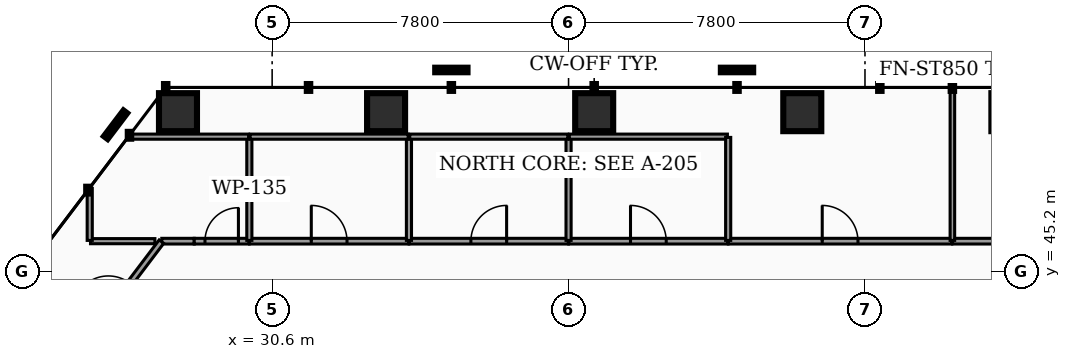
"""IFC4 building model, lengths in metres.
Left out: names, types, materials, properties, quantities, classifications, styles, units other than length and angle.
Written with IfcOpenShell. Run it as: python <this file> out.ifc"""

import sys

from ifc_helpers import new_model, si_unit, direction, frame, frame_2d, origin, origin_2d, place, context, subcontext, project, spatial, rectangle, hollow_rectangle, extrude, element, fill, save


model = new_model("IFC4")
c1 = context("Model", 3, precision=1e-05, world=origin(), true_north=direction((0.0, 1.0)))
c2 = subcontext(c1, "Body", "Model", "MODEL_VIEW")
j1 = project(units=[si_unit("LENGTHUNIT", "METRE"), si_unit("PLANEANGLEUNIT", "RADIAN")], contexts=[c1])
p1 = place(None, origin())
s1 = spatial("IfcSite", under=j1, at=p1, CompositionType="ELEMENT")
p2 = place(p1, origin())
s2 = spatial("IfcBuilding", under=s1, at=p2, CompositionType="ELEMENT")
p3 = place(p2, frame((0.0, 0.0, 43.86)))
s3 = spatial("IfcBuildingStorey", under=s2, at=p3, CompositionType="ELEMENT", Elevation=43.86)
for number, where, z_axis, x_axis in (
    (1, (44.55, 49.394, 0.0), (0.0, 0.0, 1.0), (1.0, 0.0, 0.0)),
    (2, (39.074, 49.394, 0.0), (0.0, 0.0, 1.0), (1.0, 0.0, 0.0)),
    (3, (33.598, 49.394, 0.0), (0.0, 0.0, 1.0), (1.0, 0.0, 0.0)),
    (4, (28.122, 49.394, 0.0), (0.0, 0.0, 1.0), (1.0, 0.0, 0.0)),
):
    element("IfcColumn", number, at=place(p3, frame(where, z_axis=z_axis, x_axis=x_axis)), inside=s3, PredefinedType="COLUMN", context=c2, shape_type="SweptSolid", body=[
        extrude(hollow_rectangle(XDim=1.0, YDim=1.0, WallThickness=0.05, at=origin_2d()), origin(), (0.0, 0.0, 1.0), 3.82),
    ])
p4 = place(p3, frame((27.696, 46.0, 0.0), z_axis=(0.0, 0.0, 1.0), x_axis=(1.0, 0.0, 0.0)))
e5 = element("IfcWall", 5, at=p4, inside=s3, PredefinedType="PARTITIONING", context=c2, shape_type="SweptSolid", body=[
    extrude(rectangle(XDim=0.854, YDim=0.15, at=frame_2d((0.427, 0.0))), origin(), (0.0, 0.0, 1.0), 2.777),
])
p5 = place(p3, frame((28.55, 46.0, 0.0), z_axis=(0.0, 0.0, 1.0), x_axis=(1.0, 0.0, 0.0)))
e6 = element("IfcWall", 6, at=p5, inside=s3, PredefinedType="PARTITIONING", context=c2, shape_type="SweptSolid", body=[
    extrude(rectangle(XDim=1.445, YDim=0.15, at=frame_2d((0.723, 0.0))), origin(), (0.0, 0.0, 1.0), 2.777),
])
p6 = place(p5, frame((0.282, 0.0, 0.0)))
e7 = element("IfcOpeningElement", 7, at=p6, cuts=e6, PredefinedType="OPENING", context=c2, shape_type="SweptSolid", body=[
    extrude(rectangle(XDim=0.88, YDim=2.05, at=frame_2d((0.44, 1.025))), frame((0.0, 0.085, 0.0), z_axis=(0.0, -1.0, 0.0), x_axis=(1.0, 0.0, 0.0)), (0.0, 0.0, 1.0), 0.17),
])
p7 = place(p3, frame((30.005, 46.0, 0.0), z_axis=(0.0, 0.0, 1.0), x_axis=(1.0, 0.0, 0.0)))
e8 = element("IfcWall", 8, at=p7, inside=s3, PredefinedType="PARTITIONING", context=c2, shape_type="SweptSolid", body=[
    extrude(rectangle(XDim=4.19, YDim=0.15, at=frame_2d((2.095, 0.0))), origin(), (0.0, 0.0, 1.0), 2.777),
])
p8 = place(p7, frame((1.625, 0.0, 0.0)))
e9 = element("IfcOpeningElement", 9, at=p8, cuts=e8, PredefinedType="OPENING", context=c2, shape_type="SweptSolid", body=[
    extrude(rectangle(XDim=0.94, YDim=2.05, at=frame_2d((0.47, 1.025))), frame((0.0, 0.085, 0.0), z_axis=(0.0, -1.0, 0.0), x_axis=(1.0, 0.0, 0.0)), (0.0, 0.0, 1.0), 0.17),
])
p9 = place(p3, frame((34.205, 46.0, 0.0), z_axis=(0.0, 0.0, 1.0), x_axis=(1.0, 0.0, 0.0)))
e10 = element("IfcWall", 10, at=p9, inside=s3, PredefinedType="PARTITIONING", context=c2, shape_type="SweptSolid", body=[
    extrude(rectangle(XDim=4.19, YDim=0.15, at=frame_2d((2.095, 0.0))), origin(), (0.0, 0.0, 1.0), 2.777),
])
p10 = place(p9, frame((1.625, 0.0, 0.0)))
e11 = element("IfcOpeningElement", 11, at=p10, cuts=e10, PredefinedType="OPENING", context=c2, shape_type="SweptSolid", body=[
    extrude(rectangle(XDim=0.94, YDim=2.05, at=frame_2d((0.47, 1.025))), frame((0.0, 0.085, 0.0), z_axis=(0.0, -1.0, 0.0), x_axis=(1.0, 0.0, 0.0)), (0.0, 0.0, 1.0), 0.17),
])
p11 = place(p3, frame((38.405, 46.0, 0.0), z_axis=(0.0, 0.0, 1.0), x_axis=(1.0, 0.0, 0.0)))
e12 = element("IfcWall", 12, at=p11, inside=s3, PredefinedType="PARTITIONING", context=c2, shape_type="SweptSolid", body=[
    extrude(rectangle(XDim=4.19, YDim=0.15, at=frame_2d((2.095, 0.0))), origin(), (0.0, 0.0, 1.0), 2.777),
])
p12 = place(p11, frame((1.625, 0.0, 0.0)))
e13 = element("IfcOpeningElement", 13, at=p12, cuts=e12, PredefinedType="OPENING", context=c2, shape_type="SweptSolid", body=[
    extrude(rectangle(XDim=0.94, YDim=2.05, at=frame_2d((0.47, 1.025))), frame((0.0, 0.085, 0.0), z_axis=(0.0, -1.0, 0.0), x_axis=(1.0, 0.0, 0.0)), (0.0, 0.0, 1.0), 0.17),
])
p13 = place(p3, frame((25.462, 43.051, 0.0), z_axis=(0.0, 0.0, 1.0), x_axis=(0.603862791153, 0.7970882821, 0.0)))
e14 = element("IfcWall", 14, at=p13, inside=s3, PredefinedType="PARTITIONING", context=c2, shape_type="SweptSolid", body=[
    extrude(rectangle(XDim=3.684, YDim=0.15, at=frame_2d((1.842, 0.0))), origin(), (0.0, 0.0, 1.0), 2.777),
])
p14 = place(p13, frame((1.372, 0.0, 0.0)))
e15 = element("IfcOpeningElement", 15, at=p14, cuts=e14, PredefinedType="OPENING", context=c2, shape_type="SweptSolid", body=[
    extrude(rectangle(XDim=0.94, YDim=2.05, at=frame_2d((0.47, 1.025))), frame((0.0, 0.085, 0.0), z_axis=(0.0, -1.0, 0.0), x_axis=(1.0, 0.0, 0.0)), (0.0, 0.0, 1.0), 0.17),
])
p15 = place(p3, frame((48.505, 46.0, 0.0), z_axis=(0.0, 0.0, 1.0), x_axis=(1.0, 0.0, 0.0)))
e16 = element("IfcWall", 16, at=p15, inside=s3, PredefinedType="PARTITIONING", context=c2, shape_type="SweptSolid", body=[
    extrude(rectangle(XDim=1.925, YDim=0.15, at=frame_2d((0.962, 0.0))), origin(), (0.0, 0.0, 1.0), 2.777),
])
p16 = place(p3, frame((42.605, 46.0, 0.0), z_axis=(0.0, 0.0, 1.0), x_axis=(1.0, 0.0, 0.0)))
e17 = element("IfcWall", 17, at=p16, inside=s3, PredefinedType="PARTITIONING", context=c2, shape_type="SweptSolid", body=[
    extrude(rectangle(XDim=5.88, YDim=0.15, at=frame_2d((2.94, 0.0))), origin(), (0.0, 0.0, 1.0), 2.777),
])
p17 = place(p16, frame((2.47, 0.0, 0.0)))
e18 = element("IfcOpeningElement", 18, at=p17, cuts=e17, PredefinedType="OPENING", context=c2, shape_type="SweptSolid", body=[
    extrude(rectangle(XDim=0.94, YDim=2.05, at=frame_2d((0.47, 1.025))), frame((0.0, 0.085, 0.0), z_axis=(0.0, -1.0, 0.0), x_axis=(1.0, 0.0, 0.0)), (0.0, 0.0, 1.0), 0.17),
])
p18 = place(p3, frame((30.0, 46.02, 0.0), z_axis=(0.0, 0.0, 1.0), x_axis=(0.0, 1.0, 0.0)))
e19 = element("IfcWall", 19, at=p18, inside=s3, PredefinedType="PARTITIONING", context=c2, shape_type="SweptSolid", body=[
    extrude(rectangle(XDim=2.71, YDim=0.135, at=frame_2d((1.355, 0.0))), origin(), (0.0, 0.0, 1.0), 2.777),
])
p19 = place(p3, frame((25.82, 46.0, 0.0), z_axis=(0.0, 0.0, 1.0), x_axis=(1.0, 0.0, 0.0)))
e20 = element("IfcWall", 20, at=p19, inside=s3, PredefinedType="PARTITIONING", context=c2, shape_type="SweptSolid", body=[
    extrude(rectangle(XDim=1.695, YDim=0.135, at=frame_2d((0.847, 0.0))), origin(), (0.0, 0.0, 1.0), 2.777),
])
p20 = place(p3, frame((25.8, 46.02, 0.0), z_axis=(0.0, 0.0, 1.0), x_axis=(0.0, 1.0, 0.0)))
e21 = element("IfcWall", 21, at=p20, inside=s3, PredefinedType="PARTITIONING", context=c2, shape_type="SweptSolid", body=[
    extrude(rectangle(XDim=1.371, YDim=0.135, at=frame_2d((0.685, 0.0))), origin(), (0.0, 0.0, 1.0), 2.777),
])
p21 = place(p3, frame((26.833, 48.75, 0.0), z_axis=(0.0, 0.0, 1.0), x_axis=(1.0, 0.0, 0.0)))
e22 = element("IfcWall", 22, at=p21, inside=s3, PredefinedType="PARTITIONING", context=c2, shape_type="SweptSolid", body=[
    extrude(rectangle(XDim=3.146, YDim=0.135, at=frame_2d((1.573, 0.0))), origin(), (0.0, 0.0, 1.0), 2.777),
])
p22 = place(p3, frame((34.2, 46.02, 0.0), z_axis=(0.0, 0.0, 1.0), x_axis=(0.0, 1.0, 0.0)))
e23 = element("IfcWall", 23, at=p22, inside=s3, PredefinedType="PARTITIONING", context=c2, shape_type="SweptSolid", body=[
    extrude(rectangle(XDim=2.71, YDim=0.135, at=frame_2d((1.355, 0.0))), origin(), (0.0, 0.0, 1.0), 2.777),
])
p23 = place(p3, frame((30.02, 48.75, 0.0), z_axis=(0.0, 0.0, 1.0), x_axis=(1.0, 0.0, 0.0)))
e24 = element("IfcWall", 24, at=p23, inside=s3, PredefinedType="PARTITIONING", context=c2, shape_type="SweptSolid", body=[
    extrude(rectangle(XDim=4.16, YDim=0.135, at=frame_2d((2.08, 0.0))), origin(), (0.0, 0.0, 1.0), 2.777),
])
p24 = place(p3, frame((38.4, 46.02, 0.0), z_axis=(0.0, 0.0, 1.0), x_axis=(0.0, 1.0, 0.0)))
e25 = element("IfcWall", 25, at=p24, inside=s3, PredefinedType="PARTITIONING", context=c2, shape_type="SweptSolid", body=[
    extrude(rectangle(XDim=2.71, YDim=0.135, at=frame_2d((1.355, 0.0))), origin(), (0.0, 0.0, 1.0), 2.777),
])
p25 = place(p3, frame((34.22, 48.75, 0.0), z_axis=(0.0, 0.0, 1.0), x_axis=(1.0, 0.0, 0.0)))
e26 = element("IfcWall", 26, at=p25, inside=s3, PredefinedType="PARTITIONING", context=c2, shape_type="SweptSolid", body=[
    extrude(rectangle(XDim=4.16, YDim=0.135, at=frame_2d((2.08, 0.0))), origin(), (0.0, 0.0, 1.0), 2.777),
])
p26 = place(p3, frame((38.42, 48.75, 0.0), z_axis=(0.0, 0.0, 1.0), x_axis=(1.0, 0.0, 0.0)))
e27 = element("IfcWall", 27, at=p26, inside=s3, PredefinedType="PARTITIONING", context=c2, shape_type="SweptSolid", body=[
    extrude(rectangle(XDim=4.16, YDim=0.135, at=frame_2d((2.08, 0.0))), origin(), (0.0, 0.0, 1.0), 2.777),
])
p27 = place(p3, frame((42.6, 46.02, 0.0), z_axis=(0.0, 0.0, 1.0), x_axis=(0.0, 1.0, 0.0)))
e28 = element("IfcWall", 28, at=p27, inside=s3, PredefinedType="PARTITIONING", context=c2, shape_type="SweptSolid", body=[
    extrude(rectangle(XDim=2.71, YDim=0.135, at=frame_2d((1.355, 0.0))), origin(), (0.0, 0.0, 1.0), 2.777),
])
p28 = place(p3, frame((48.5, 46.02, 0.0), z_axis=(0.0, 0.0, 1.0), x_axis=(0.0, 1.0, 0.0)))
e29 = element("IfcWall", 29, at=p28, inside=s3, PredefinedType="PARTITIONING", context=c2, shape_type="SweptSolid", body=[
    extrude(rectangle(XDim=4.009, YDim=0.12, at=frame_2d((2.005, 0.0))), origin(), (0.0, 0.0, 1.0), 2.777),
])
p29 = place(p6, origin())
e30 = element("IfcDoor", 30, at=p29, inside=s3, OperationType="SINGLE_SWING_RIGHT", PredefinedType="DOOR", context=c2, shape_type="SweptSolid", body=[
    extrude(rectangle(XDim=0.88, YDim=2.05, at=frame_2d((0.44, 1.025))), frame((0.0, 0.025, 0.0), z_axis=(0.0, -1.0, 0.0), x_axis=(1.0, 0.0, 0.0)), (0.0, 0.0, 1.0), 0.05),
])
fill(e7, e30)
p30 = place(p8, origin())
e31 = element("IfcDoor", 31, at=p30, inside=s3, OperationType="SINGLE_SWING_LEFT", PredefinedType="DOOR", context=c2, shape_type="SweptSolid", body=[
    extrude(rectangle(XDim=0.94, YDim=2.05, at=frame_2d((0.47, 1.025))), frame((0.0, 0.025, 0.0), z_axis=(0.0, -1.0, 0.0), x_axis=(1.0, 0.0, 0.0)), (0.0, 0.0, 1.0), 0.05),
])
fill(e9, e31)
p31 = place(p10, origin())
e32 = element("IfcDoor", 32, at=p31, inside=s3, OperationType="SINGLE_SWING_RIGHT", PredefinedType="DOOR", context=c2, shape_type="SweptSolid", body=[
    extrude(rectangle(XDim=0.94, YDim=2.05, at=frame_2d((0.47, 1.025))), frame((0.0, 0.025, 0.0), z_axis=(0.0, -1.0, 0.0), x_axis=(1.0, 0.0, 0.0)), (0.0, 0.0, 1.0), 0.05),
])
fill(e11, e32)
p32 = place(p12, origin())
e33 = element("IfcDoor", 33, at=p32, inside=s3, OperationType="SINGLE_SWING_LEFT", PredefinedType="DOOR", context=c2, shape_type="SweptSolid", body=[
    extrude(rectangle(XDim=0.94, YDim=2.05, at=frame_2d((0.47, 1.025))), frame((0.0, 0.025, 0.0), z_axis=(0.0, -1.0, 0.0), x_axis=(1.0, 0.0, 0.0)), (0.0, 0.0, 1.0), 0.05),
])
fill(e13, e33)
p33 = place(p17, origin())
e34 = element("IfcDoor", 34, at=p33, inside=s3, OperationType="SINGLE_SWING_LEFT", PredefinedType="DOOR", context=c2, shape_type="SweptSolid", body=[
    extrude(rectangle(XDim=0.94, YDim=2.05, at=frame_2d((0.47, 1.025))), frame((0.0, 0.025, 0.0), z_axis=(0.0, -1.0, 0.0), x_axis=(1.0, 0.0, 0.0)), (0.0, 0.0, 1.0), 0.05),
])
fill(e18, e34)
save(model, sys.argv[1])
